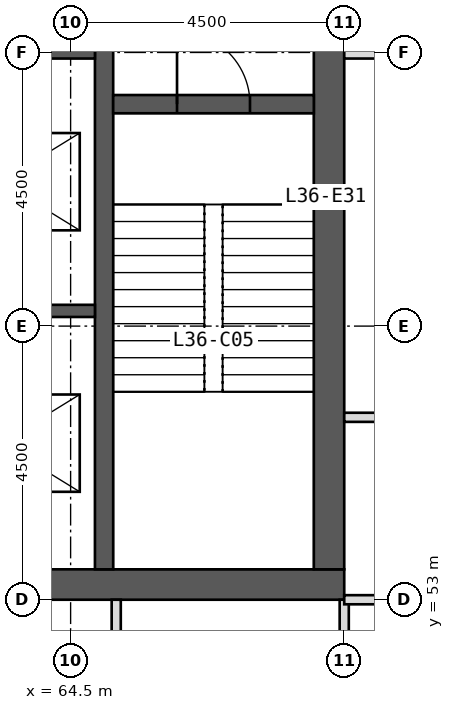
"""IFC4 building model, lengths in metres.
Left out: names, types, materials, properties, quantities, classifications, styles, units other than length and angle.
Written with IfcOpenShell. Run it as: python <this file> out.ifc"""

import sys

from ifc_helpers import new_model, si_unit, direction, frame, frame_2d, origin, place, context, subcontext, project, spatial, rectangle, extrude, element, fill, save


model = new_model("IFC4")
c1 = context("Model", 3, precision=1e-05, world=origin(), true_north=direction((0.0, 1.0)))
c2 = subcontext(c1, "Body", "Model", "MODEL_VIEW")
j1 = project(units=[si_unit("LENGTHUNIT", "METRE"), si_unit("PLANEANGLEUNIT", "RADIAN")], contexts=[c1])
p1 = place(None, origin())
s1 = spatial("IfcSite", under=j1, at=p1, CompositionType="ELEMENT")
p2 = place(p1, origin())
s2 = spatial("IfcBuilding", under=s1, at=p2, CompositionType="ELEMENT")
p3 = place(p2, frame((0.0, 0.0, 152.0)))
s3 = spatial("IfcBuildingStorey", under=s2, at=p3, CompositionType="ELEMENT", Elevation=152.0)
p4 = place(p3, frame((51.0, 53.25, 0.0), z_axis=(0.0, 0.0, 1.0), x_axis=(1.0, 0.0, 0.0)))
e1 = element("IfcWall", 1, at=p4, inside=s3, PredefinedType="SHEAR", context=c2, shape_type="SweptSolid", body=[
    extrude(rectangle(XDim=18.0, YDim=0.5, at=frame_2d((9.0, 0.0))), origin(), (0.0, 0.0, 1.0), 4.0),
])
p5 = place(p4, frame((8.1, 0.0, 0.0)))
e2 = element("IfcOpeningElement", 2, at=p5, cuts=e1, PredefinedType="OPENING", context=c2, shape_type="SweptSolid", body=[
    extrude(rectangle(XDim=1.8, YDim=2.2, at=frame_2d((0.9, 1.1))), frame((0.0, 0.26, 0.0), z_axis=(0.0, -1.0, 0.0), x_axis=(1.0, 0.0, 0.0)), (0.0, 0.0, 1.0), 0.52),
])
p6 = place(p3, frame((68.75, 53.5, 0.0), z_axis=(0.0, 0.0, 1.0), x_axis=(0.0, 1.0, 0.0)))
e3 = element("IfcWall", 3, at=p6, inside=s3, PredefinedType="SHEAR", context=c2, shape_type="SweptSolid", body=[
    extrude(rectangle(XDim=17.0, YDim=0.5, at=frame_2d((8.5, 0.0))), origin(), (0.0, 0.0, 1.0), 4.0),
])
p7 = place(p6, frame((9.5, 0.0, 0.0)))
e4 = element("IfcOpeningElement", 4, at=p7, cuts=e3, PredefinedType="OPENING", context=c2, shape_type="SweptSolid", body=[
    extrude(rectangle(XDim=1.5, YDim=2.2, at=frame_2d((0.75, 1.1))), frame((0.0, 0.26, 0.0), z_axis=(0.0, -1.0, 0.0), x_axis=(1.0, 0.0, 0.0)), (0.0, 0.0, 1.0), 0.52),
])
p8 = place(p3, frame((65.05, 53.5, 0.0), z_axis=(0.0, 0.0, 1.0), x_axis=(0.0, 1.0, 0.0)))
e5 = element("IfcWall", 5, at=p8, inside=s3, PredefinedType="SHEAR", context=c2, shape_type="SweptSolid", body=[
    extrude(rectangle(XDim=17.0, YDim=0.3, at=frame_2d((8.5, 0.0))), origin(), (0.0, 0.0, 1.0), 4.0),
])
for number, where, z_axis, x_axis in (
    (6, (61.85, 57.75, 0.0), (0.0, 0.0, 1.0), (1.0, 0.0, 0.0)),
    (7, (61.85, 62.0, 0.0), (0.0, 0.0, 1.0), (1.0, 0.0, 0.0)),
):
    element("IfcWall", number, at=place(p3, frame(where, z_axis=z_axis, x_axis=x_axis)), inside=s3, PredefinedType="SHEAR", context=c2, shape_type="SweptSolid", body=[
        extrude(rectangle(XDim=3.05, YDim=0.2, at=frame_2d((1.525, 0.0))), origin(), (0.0, 0.0, 1.0), 4.0),
    ])
p9 = place(p3, frame((65.2, 61.15, 0.0), z_axis=(0.0, 0.0, 1.0), x_axis=(1.0, 0.0, 0.0)))
e8 = element("IfcWall", 8, at=p9, inside=s3, PredefinedType="SHEAR", context=c2, shape_type="SweptSolid", body=[
    extrude(rectangle(XDim=3.3, YDim=0.3, at=frame_2d((1.65, 0.0))), origin(), (0.0, 0.0, 1.0), 4.0),
])
p10 = place(p9, frame((1.05, 0.0, 0.0)))
e9 = element("IfcOpeningElement", 9, at=p10, cuts=e8, PredefinedType="OPENING", context=c2, shape_type="SweptSolid", body=[
    extrude(rectangle(XDim=1.2, YDim=2.1, at=frame_2d((0.6, 1.05))), frame((0.0, 0.16, 0.0), z_axis=(0.0, -1.0, 0.0), x_axis=(1.0, 0.0, 0.0)), (0.0, 0.0, 1.0), 0.32),
])
p11 = place(p3, frame((69.0, 53.0, 0.0), z_axis=(0.0, 0.0, 1.0), x_axis=(0.0, -1.0, 0.0)))
e10 = element("IfcWall", 10, at=p11, inside=s3, PredefinedType="PARTITIONING", context=c2, shape_type="SweptSolid", body=[
    extrude(rectangle(XDim=6.6, YDim=0.15, at=frame_2d((3.3, 0.0))), origin(), (0.0, 0.0, 1.0), 3.75),
])
p12 = place(p3, frame((65.25, 53.0, 0.0), z_axis=(0.0, 0.0, 1.0), x_axis=(0.0, -1.0, 0.0)))
e11 = element("IfcWall", 11, at=p12, inside=s3, PredefinedType="PARTITIONING", context=c2, shape_type="SweptSolid", body=[
    extrude(rectangle(XDim=2.4, YDim=0.15, at=frame_2d((1.2, 0.0))), origin(), (0.0, 0.0, 1.0), 3.75),
])
p13 = place(p3, frame((69.0, 62.0, 0.0), z_axis=(0.0, 0.0, 1.0), x_axis=(1.0, 0.0, 0.0)))
e12 = element("IfcWall", 12, at=p13, inside=s3, PredefinedType="SOLIDWALL", context=c2, shape_type="SweptSolid", body=[
    extrude(rectangle(XDim=6.6, YDim=0.2, at=frame_2d((3.3, 0.0))), origin(), (0.0, 0.0, 1.0), 2.95),
])
for number, where, z_axis, x_axis in (
    (13, (69.0, 56.0, 0.0), (0.0, 0.0, 1.0), (1.0, 0.0, 0.0)),
    (14, (69.0, 53.0, 0.0), (0.0, 0.0, 1.0), (1.0, 0.0, 0.0)),
):
    element("IfcWall", number, at=place(p3, frame(where, z_axis=z_axis, x_axis=x_axis)), inside=s3, PredefinedType="PARTITIONING", context=c2, shape_type="SweptSolid", body=[
        extrude(rectangle(XDim=6.6, YDim=0.15, at=frame_2d((3.3, 0.0))), origin(), (0.0, 0.0, 1.0), 3.75),
    ])
p14 = place(p10, origin())
e15 = element("IfcDoor", 15, at=p14, inside=s3, OperationType="SINGLE_SWING_LEFT", PredefinedType="DOOR", context=c2, shape_type="SweptSolid", body=[
    extrude(rectangle(XDim=1.2, YDim=2.1, at=frame_2d((0.6, 1.05))), frame((0.0, 0.025, 0.0), z_axis=(0.0, -1.0, 0.0), x_axis=(1.0, 0.0, 0.0)), (0.0, 0.0, 1.0), 0.05),
])
fill(e9, e15)
save(model, sys.argv[1])
